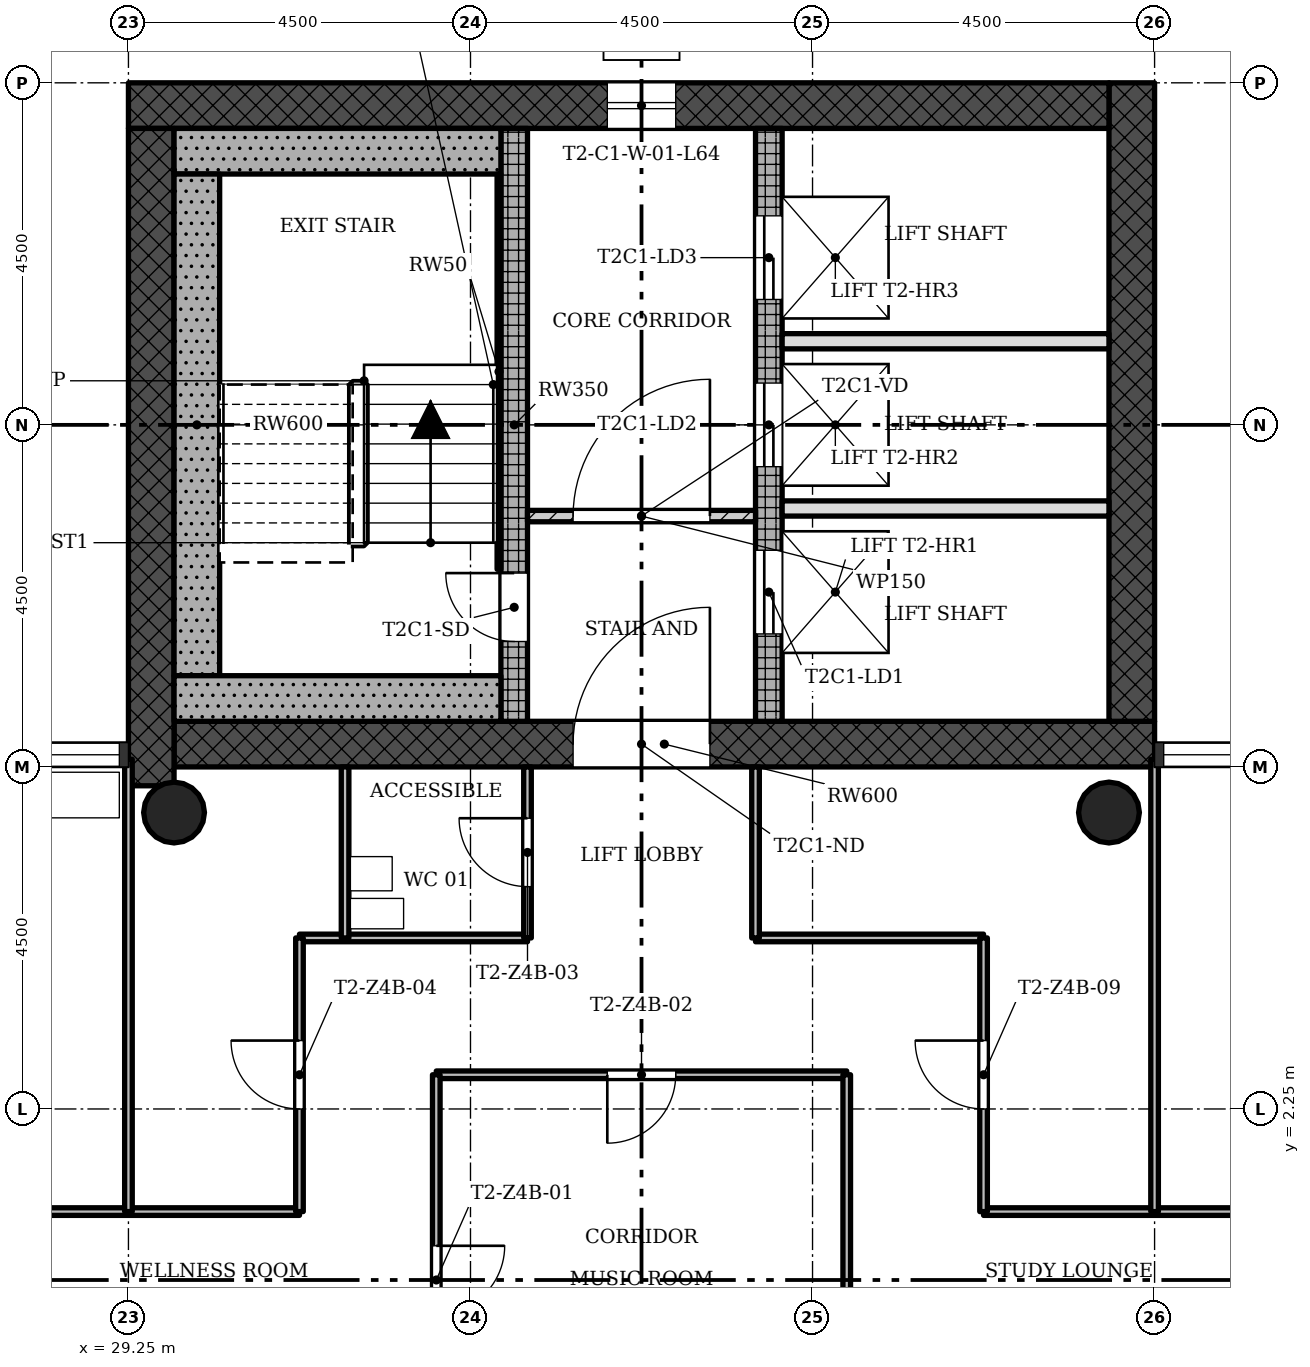
"""IFC4 building model, lengths in metres.
Left out: names, types, materials, properties, quantities, classifications, styles, units other than length and angle.
Written with IfcOpenShell. Run it as: python <this file> out.ifc"""

import sys

from ifc_helpers import new_model, si_unit, direction, frame, frame_2d, origin, origin_2d, place, context, subcontext, project, spatial, rectangle, hollow_circle, extrude, element, fill, save


model = new_model("IFC4")
c1 = context("Model", 3, precision=1e-05, world=origin(), true_north=direction((0.0, 1.0)))
c2 = subcontext(c1, "Body", "Model", "MODEL_VIEW")
j1 = project(units=[si_unit("LENGTHUNIT", "METRE"), si_unit("PLANEANGLEUNIT", "RADIAN")], contexts=[c1])
p1 = place(None, origin())
s1 = spatial("IfcSite", under=j1, at=p1, CompositionType="ELEMENT")
p2 = place(p1, origin())
s2 = spatial("IfcBuilding", under=s1, at=p2, CompositionType="ELEMENT")
p3 = place(p2, frame((0.0, 0.0, 230.0)))
s3 = spatial("IfcBuildingStorey", under=s2, at=p3, CompositionType="ELEMENT", Elevation=230.0)
p4 = place(p3, frame((29.85, 7.05, 0.0), z_axis=(0.0, 0.0, 1.0), x_axis=(1.0, 0.0, 0.0)))
e1 = element("IfcWall", 1, at=p4, inside=s3, PredefinedType="SHEAR", context=c2, shape_type="SweptSolid", body=[
    extrude(rectangle(XDim=12.9, YDim=0.6, at=frame_2d((6.45, 0.0))), origin(), (0.0, 0.0, 1.0), 3.4),
])
p5 = place(p4, frame((5.25, 0.0, 0.0)))
e2 = element("IfcOpeningElement", 2, at=p5, cuts=e1, PredefinedType="OPENING", context=c2, shape_type="SweptSolid", body=[
    extrude(rectangle(XDim=1.8, YDim=2.1, at=frame_2d((0.9, 1.05))), frame((0.0, 0.31, 0.0), z_axis=(0.0, -1.0, 0.0), x_axis=(1.0, 0.0, 0.0)), (0.0, 0.0, 1.0), 0.62),
])
p6 = place(p3, frame((42.45, 7.35, 0.0), z_axis=(0.0, 0.0, 1.0), x_axis=(0.0, 1.0, 0.0)))
e3 = element("IfcWall", 3, at=p6, inside=s3, PredefinedType="SHEAR", context=c2, shape_type="SweptSolid", body=[
    extrude(rectangle(XDim=8.4, YDim=0.6, at=frame_2d((4.2, 0.0))), origin(), (0.0, 0.0, 1.0), 3.4),
])
p7 = place(p3, frame((42.15, 15.45, 0.0), z_axis=(0.0, 0.0, 1.0), x_axis=(-1.0, 0.0, 0.0)))
e4 = element("IfcWall", 4, at=p7, inside=s3, PredefinedType="SHEAR", context=c2, shape_type="SweptSolid", body=[
    extrude(rectangle(XDim=12.9, YDim=0.6, at=frame_2d((6.45, 0.0))), origin(), (0.0, 0.0, 1.0), 3.4),
])
p8 = place(p7, frame((5.7, 0.0, 0.45)))
e5 = element("IfcOpeningElement", 5, at=p8, cuts=e4, PredefinedType="OPENING", context=c2, shape_type="SweptSolid", body=[
    extrude(rectangle(XDim=0.9, YDim=2.4, at=frame_2d((0.45, 1.2))), frame((0.0, 0.31, 0.0), z_axis=(0.0, -1.0, 0.0), x_axis=(1.0, 0.0, 0.0)), (0.0, 0.0, 1.0), 0.62),
])
p9 = place(p3, frame((29.55, 15.15, 0.0), z_axis=(0.0, 0.0, 1.0), x_axis=(0.0, -1.0, 0.0)))
e6 = element("IfcWall", 6, at=p9, inside=s3, PredefinedType="SHEAR", context=c2, shape_type="SweptSolid", body=[
    extrude(rectangle(XDim=8.648, YDim=0.6, at=frame_2d((4.324, 0.0))), origin(), (0.0, 0.0, 1.0), 3.4),
])
p10 = place(p3, frame((34.325, 7.35, 0.0), z_axis=(0.0, 0.0, 1.0), x_axis=(0.0, 1.0, 0.0)))
e7 = element("IfcWall", 7, at=p10, inside=s3, PredefinedType="SHEAR", context=c2, shape_type="SweptSolid", body=[
    extrude(rectangle(XDim=7.8, YDim=0.35, at=frame_2d((3.9, 0.0))), origin(), (0.0, 0.0, 1.0), 3.4),
])
p11 = place(p10, frame((1.05, 0.0, 0.0)))
e8 = element("IfcOpeningElement", 8, at=p11, cuts=e7, PredefinedType="OPENING", context=c2, shape_type="SweptSolid", body=[
    extrude(rectangle(XDim=0.9, YDim=2.1, at=frame_2d((0.45, 1.05))), frame((0.0, 0.185, 0.0), z_axis=(0.0, -1.0, 0.0), x_axis=(1.0, 0.0, 0.0)), (0.0, 0.0, 1.0), 0.37),
])
p12 = place(p3, frame((37.675, 7.35, 0.0), z_axis=(0.0, 0.0, 1.0), x_axis=(0.0, 1.0, 0.0)))
e9 = element("IfcWall", 9, at=p12, inside=s3, PredefinedType="SHEAR", context=c2, shape_type="SweptSolid", body=[
    extrude(rectangle(XDim=7.8, YDim=0.35, at=frame_2d((3.9, 0.0))), origin(), (0.0, 0.0, 1.0), 3.4),
])
p13 = place(p12, frame((1.15, 0.0, 0.0)))
e10 = element("IfcOpeningElement", 10, at=p13, cuts=e9, PredefinedType="OPENING", context=c2, shape_type="SweptSolid", body=[
    extrude(rectangle(XDim=1.1, YDim=2.1, at=frame_2d((0.55, 1.05))), frame((0.0, 0.185, 0.0), z_axis=(0.0, -1.0, 0.0), x_axis=(1.0, 0.0, 0.0)), (0.0, 0.0, 1.0), 0.37),
])
p14 = place(p12, frame((3.35, 0.0, 0.0)))
e11 = element("IfcOpeningElement", 11, at=p14, cuts=e9, PredefinedType="OPENING", context=c2, shape_type="SweptSolid", body=[
    extrude(rectangle(XDim=1.1, YDim=2.1, at=frame_2d((0.55, 1.05))), frame((0.0, 0.185, 0.0), z_axis=(0.0, -1.0, 0.0), x_axis=(1.0, 0.0, 0.0)), (0.0, 0.0, 1.0), 0.37),
])
p15 = place(p12, frame((5.55, 0.0, 0.0)))
e12 = element("IfcOpeningElement", 12, at=p15, cuts=e9, PredefinedType="OPENING", context=c2, shape_type="SweptSolid", body=[
    extrude(rectangle(XDim=1.1, YDim=2.1, at=frame_2d((0.55, 1.05))), frame((0.0, 0.185, 0.0), z_axis=(0.0, -1.0, 0.0), x_axis=(1.0, 0.0, 0.0)), (0.0, 0.0, 1.0), 0.37),
])
for number, where, z_axis, x_axis in (
    (13, (42.15, 6.15, 0.0), (0.0, 0.0, 1.0), (1.0, 0.0, 0.0)),
    (14, (29.85, 6.15, 0.0), (0.0, 0.0, 1.0), (1.0, 0.0, 0.0)),
):
    element("IfcColumn", number, at=place(p3, frame(where, z_axis=z_axis, x_axis=x_axis)), inside=s3, PredefinedType="COLUMN", context=c2, shape_type="SweptSolid", body=[
        extrude(hollow_circle(Radius=0.4, WallThickness=0.028, at=origin_2d()), origin(), (0.0, 0.0, 1.0), 3.4),
    ])
p16 = place(p3, frame((37.5, 10.05, 0.0), z_axis=(0.0, 0.0, 1.0), x_axis=(-1.0, 0.0, 0.0)))
e15 = element("IfcWall", 15, at=p16, inside=s3, PredefinedType="PARTITIONING", context=c2, shape_type="SweptSolid", body=[
    extrude(rectangle(XDim=3.0, YDim=0.15, at=frame_2d((1.5, 0.0))), origin(), (0.0, 0.0, 1.0), 2.98),
])
p17 = place(p16, frame((0.6, 0.0, 0.0)))
e16 = element("IfcOpeningElement", 16, at=p17, cuts=e15, PredefinedType="OPENING", context=c2, shape_type="SweptSolid", body=[
    extrude(rectangle(XDim=1.8, YDim=2.1, at=frame_2d((0.9, 1.05))), frame((0.0, 0.085, 0.0), z_axis=(0.0, -1.0, 0.0), x_axis=(1.0, 0.0, 0.0)), (0.0, 0.0, 1.0), 0.17),
])
for number, where, z_axis, x_axis in (
    (17, (42.15, 10.15, 0.0), (0.0, 0.0, 1.0), (-1.0, 0.0, 0.0)),
    (18, (42.15, 12.35, 0.0), (0.0, 0.0, 1.0), (-1.0, 0.0, 0.0)),
):
    element("IfcWall", number, at=place(p3, frame(where, z_axis=z_axis, x_axis=x_axis)), inside=s3, PredefinedType="SOLIDWALL", context=c2, shape_type="SweptSolid", body=[
        extrude(rectangle(XDim=4.3, YDim=0.2, at=frame_2d((2.15, 0.0))), origin(), (0.0, 0.0, 1.0), 2.98),
    ])
for number, where, z_axis, x_axis in (
    (19, (44.55, 0.9, 0.0), (0.0, 0.0, 1.0), (-1.0, 0.0, 0.0)),
    (20, (31.5, 0.9, 0.0), (0.0, 0.0, 1.0), (-1.0, 0.0, 0.0)),
):
    element("IfcWall", number, at=place(p3, frame(where, z_axis=z_axis, x_axis=x_axis)), inside=s3, PredefinedType="PARTITIONING", context=c2, shape_type="SweptSolid", body=[
        extrude(rectangle(XDim=4.05, YDim=0.1, at=frame_2d((2.025, 0.0))), origin(), (0.0, 0.0, 1.0), 2.98),
    ])
p18 = place(p3, frame((38.7, 2.7, 0.0), z_axis=(0.0, 0.0, 1.0), x_axis=(-1.0, 0.0, 0.0)))
e21 = element("IfcWall", 21, at=p18, inside=s3, PredefinedType="PARTITIONING", context=c2, shape_type="SweptSolid", body=[
    extrude(rectangle(XDim=5.4, YDim=0.1, at=frame_2d((2.7, 0.0))), origin(), (0.0, 0.0, 1.0), 2.98),
])
p19 = place(p18, frame((2.25, 0.0, 0.0)))
e22 = element("IfcOpeningElement", 22, at=p19, cuts=e21, PredefinedType="OPENING", context=c2, shape_type="SweptSolid", body=[
    extrude(rectangle(XDim=0.9, YDim=2.1, at=frame_2d((0.45, 1.05))), frame((0.0, 0.06, 0.0), z_axis=(0.0, -1.0, 0.0), x_axis=(1.0, 0.0, 0.0)), (0.0, 0.0, 1.0), 0.12),
])
for number, where, z_axis, x_axis in (
    (23, (40.5, 4.5, 0.0), (0.0, 0.0, 1.0), (-1.0, 0.0, 0.0)),
    (24, (34.5, 4.5, 0.0), (0.0, 0.0, 1.0), (-1.0, 0.0, 0.0)),
):
    element("IfcWall", number, at=place(p3, frame(where, z_axis=z_axis, x_axis=x_axis)), inside=s3, PredefinedType="PARTITIONING", context=c2, shape_type="SweptSolid", body=[
        extrude(rectangle(XDim=3.0, YDim=0.1, at=frame_2d((1.5, 0.0))), origin(), (0.0, 0.0, 1.0), 2.98),
    ])
p20 = place(p3, frame((42.75, 0.9, 0.0), z_axis=(0.0, 0.0, 1.0), x_axis=(0.0, 1.0, 0.0)))
e25 = element("IfcWall", 25, at=p20, inside=s3, PredefinedType="PARTITIONING", context=c2, shape_type="SweptSolid", body=[
    extrude(rectangle(XDim=5.95, YDim=0.1, at=frame_2d((2.975, 0.0))), origin(), (0.0, 0.0, 1.0), 2.98),
])
p21 = place(p3, frame((40.5, 0.9, 0.0), z_axis=(0.0, 0.0, 1.0), x_axis=(0.0, 1.0, 0.0)))
e26 = element("IfcWall", 26, at=p21, inside=s3, PredefinedType="PARTITIONING", context=c2, shape_type="SweptSolid", body=[
    extrude(rectangle(XDim=3.6, YDim=0.1, at=frame_2d((1.8, 0.0))), origin(), (0.0, 0.0, 1.0), 2.98),
])
p22 = place(p21, frame((1.35, 0.0, 0.0)))
e27 = element("IfcOpeningElement", 27, at=p22, cuts=e26, PredefinedType="OPENING", context=c2, shape_type="SweptSolid", body=[
    extrude(rectangle(XDim=0.9, YDim=2.1, at=frame_2d((0.45, 1.05))), frame((0.0, 0.06, 0.0), z_axis=(0.0, -1.0, 0.0), x_axis=(1.0, 0.0, 0.0)), (0.0, 0.0, 1.0), 0.12),
])
p23 = place(p3, frame((38.7, -2.7, 0.0), z_axis=(0.0, 0.0, 1.0), x_axis=(0.0, 1.0, 0.0)))
e28 = element("IfcWall", 28, at=p23, inside=s3, PredefinedType="PARTITIONING", context=c2, shape_type="SweptSolid", body=[
    extrude(rectangle(XDim=5.4, YDim=0.1, at=frame_2d((2.7, 0.0))), origin(), (0.0, 0.0, 1.0), 2.98),
])
p24 = place(p3, frame((37.5, 4.5, 0.0), z_axis=(0.0, 0.0, 1.0), x_axis=(0.0, 1.0, 0.0)))
e29 = element("IfcWall", 29, at=p24, inside=s3, PredefinedType="PARTITIONING", context=c2, shape_type="SweptSolid", body=[
    extrude(rectangle(XDim=2.25, YDim=0.1, at=frame_2d((1.125, 0.0))), origin(), (0.0, 0.0, 1.0), 2.98),
])
p25 = place(p3, frame((34.5, 4.5, 0.0), z_axis=(0.0, 0.0, 1.0), x_axis=(0.0, 1.0, 0.0)))
e30 = element("IfcWall", 30, at=p25, inside=s3, PredefinedType="PARTITIONING", context=c2, shape_type="SweptSolid", body=[
    extrude(rectangle(XDim=2.25, YDim=0.1, at=frame_2d((1.125, 0.0))), origin(), (0.0, 0.0, 1.0), 2.98),
])
p26 = place(p25, frame((0.675, 0.0, 0.0)))
e31 = element("IfcOpeningElement", 31, at=p26, cuts=e30, PredefinedType="OPENING", context=c2, shape_type="SweptSolid", body=[
    extrude(rectangle(XDim=0.9, YDim=2.1, at=frame_2d((0.45, 1.05))), frame((0.0, 0.06, 0.0), z_axis=(0.0, -1.0, 0.0), x_axis=(1.0, 0.0, 0.0)), (0.0, 0.0, 1.0), 0.12),
])
p27 = place(p3, frame((33.3, -2.7, 0.0), z_axis=(0.0, 0.0, 1.0), x_axis=(0.0, 1.0, 0.0)))
e32 = element("IfcWall", 32, at=p27, inside=s3, PredefinedType="PARTITIONING", context=c2, shape_type="SweptSolid", body=[
    extrude(rectangle(XDim=5.4, YDim=0.1, at=frame_2d((2.7, 0.0))), origin(), (0.0, 0.0, 1.0), 2.98),
])
p28 = place(p27, frame((2.25, 0.0, 0.0)))
e33 = element("IfcOpeningElement", 33, at=p28, cuts=e32, PredefinedType="OPENING", context=c2, shape_type="SweptSolid", body=[
    extrude(rectangle(XDim=0.9, YDim=2.1, at=frame_2d((0.45, 1.05))), frame((0.0, 0.06, 0.0), z_axis=(0.0, -1.0, 0.0), x_axis=(1.0, 0.0, 0.0)), (0.0, 0.0, 1.0), 0.12),
])
p29 = place(p3, frame((32.1, 4.5, 0.0), z_axis=(0.0, 0.0, 1.0), x_axis=(0.0, 1.0, 0.0)))
e34 = element("IfcWall", 34, at=p29, inside=s3, PredefinedType="PARTITIONING", context=c2, shape_type="SweptSolid", body=[
    extrude(rectangle(XDim=2.25, YDim=0.1, at=frame_2d((1.125, 0.0))), origin(), (0.0, 0.0, 1.0), 2.98),
])
p30 = place(p3, frame((31.5, 0.9, 0.0), z_axis=(0.0, 0.0, 1.0), x_axis=(0.0, 1.0, 0.0)))
e35 = element("IfcWall", 35, at=p30, inside=s3, PredefinedType="PARTITIONING", context=c2, shape_type="SweptSolid", body=[
    extrude(rectangle(XDim=3.6, YDim=0.1, at=frame_2d((1.8, 0.0))), origin(), (0.0, 0.0, 1.0), 2.98),
])
p31 = place(p30, frame((1.35, 0.0, 0.0)))
e36 = element("IfcOpeningElement", 36, at=p31, cuts=e35, PredefinedType="OPENING", context=c2, shape_type="SweptSolid", body=[
    extrude(rectangle(XDim=0.9, YDim=2.1, at=frame_2d((0.45, 1.05))), frame((0.0, 0.06, 0.0), z_axis=(0.0, -1.0, 0.0), x_axis=(1.0, 0.0, 0.0)), (0.0, 0.0, 1.0), 0.12),
])
p32 = place(p3, frame((29.25, 0.9, 0.0), z_axis=(0.0, 0.0, 1.0), x_axis=(0.0, 1.0, 0.0)))
e37 = element("IfcWall", 37, at=p32, inside=s3, PredefinedType="PARTITIONING", context=c2, shape_type="SweptSolid", body=[
    extrude(rectangle(XDim=5.95, YDim=0.1, at=frame_2d((2.975, 0.0))), origin(), (0.0, 0.0, 1.0), 2.98),
])
p33 = place(p3, frame((34.15, 14.85, 0.0), z_axis=(0.0, 0.0, 1.0), x_axis=(-1.0, 0.0, 0.0)))
e38 = element("IfcWall", 38, at=p33, inside=s3, PredefinedType="SHEAR", context=c2, shape_type="SweptSolid", body=[
    extrude(rectangle(XDim=4.3, YDim=0.6, at=frame_2d((2.15, 0.0))), origin(), (0.0, 0.0, 1.0), 3.4),
])
p34 = place(p3, frame((30.15, 7.95, 0.0), z_axis=(0.0, 0.0, 1.0), x_axis=(0.0, 1.0, 0.0)))
e39 = element("IfcWall", 39, at=p34, inside=s3, PredefinedType="SHEAR", context=c2, shape_type="SweptSolid", body=[
    extrude(rectangle(XDim=6.6, YDim=0.6, at=frame_2d((3.3, 0.0))), origin(), (0.0, 0.0, 1.0), 3.4),
])
p35 = place(p3, frame((34.15, 7.65, 0.0), z_axis=(0.0, 0.0, 1.0), x_axis=(-1.0, 0.0, 0.0)))
e40 = element("IfcWall", 40, at=p35, inside=s3, PredefinedType="SHEAR", context=c2, shape_type="SweptSolid", body=[
    extrude(rectangle(XDim=4.3, YDim=0.6, at=frame_2d((2.15, 0.0))), origin(), (0.0, 0.0, 1.0), 3.4),
])
p36 = place(p3, frame((34.125, 9.35, 0.0), z_axis=(0.0, 0.0, 1.0), x_axis=(0.0, 1.0, 0.0)))
e41 = element("IfcWall", 41, at=p36, inside=s3, PredefinedType="SHEAR", context=c2, shape_type="SweptSolid", body=[
    extrude(rectangle(XDim=5.2, YDim=0.05, at=frame_2d((2.6, 0.0))), origin(), (0.0, 0.0, 1.0), 3.4),
])
p37 = place(p8, origin())
e42 = element("IfcWindow", 42, at=p37, inside=s3, PartitioningType="SINGLE_PANEL", PredefinedType="WINDOW", context=c2, shape_type="SweptSolid", body=[
    extrude(rectangle(XDim=0.9, YDim=2.4, at=frame_2d((0.45, 1.2))), frame((0.0, 0.03, 0.0), z_axis=(0.0, -1.0, 0.0), x_axis=(1.0, 0.0, 0.0)), (0.0, 0.0, 1.0), 0.06),
])
fill(e5, e42)
p38 = place(p17, origin())
e43 = element("IfcDoor", 43, at=p38, inside=s3, OperationType="SINGLE_SWING_LEFT", PredefinedType="DOOR", context=c2, shape_type="SweptSolid", body=[
    extrude(rectangle(XDim=1.8, YDim=2.1, at=frame_2d((0.9, 1.05))), frame((0.0, 0.025, 0.0), z_axis=(0.0, -1.0, 0.0), x_axis=(1.0, 0.0, 0.0)), (0.0, 0.0, 1.0), 0.05),
])
fill(e16, e43)
p39 = place(p28, origin())
e44 = element("IfcDoor", 44, at=p39, inside=s3, OperationType="SINGLE_SWING_RIGHT", PredefinedType="DOOR", context=c2, shape_type="SweptSolid", body=[
    extrude(rectangle(XDim=0.9, YDim=2.1, at=frame_2d((0.45, 1.05))), frame((0.0, 0.025, 0.0), z_axis=(0.0, -1.0, 0.0), x_axis=(1.0, 0.0, 0.0)), (0.0, 0.0, 1.0), 0.05),
])
fill(e33, e44)
p40 = place(p19, origin())
e45 = element("IfcDoor", 45, at=p40, inside=s3, OperationType="SINGLE_SWING_LEFT", PredefinedType="DOOR", context=c2, shape_type="SweptSolid", body=[
    extrude(rectangle(XDim=0.9, YDim=2.1, at=frame_2d((0.45, 1.05))), frame((0.0, 0.025, 0.0), z_axis=(0.0, -1.0, 0.0), x_axis=(1.0, 0.0, 0.0)), (0.0, 0.0, 1.0), 0.05),
])
fill(e22, e45)
p41 = place(p26, origin())
e46 = element("IfcDoor", 46, at=p41, inside=s3, OperationType="SINGLE_SWING_LEFT", PredefinedType="DOOR", context=c2, shape_type="SweptSolid", body=[
    extrude(rectangle(XDim=0.9, YDim=2.1, at=frame_2d((0.45, 1.05))), frame((0.0, 0.025, 0.0), z_axis=(0.0, -1.0, 0.0), x_axis=(1.0, 0.0, 0.0)), (0.0, 0.0, 1.0), 0.05),
])
fill(e31, e46)
p42 = place(p31, origin())
e47 = element("IfcDoor", 47, at=p42, inside=s3, OperationType="SINGLE_SWING_LEFT", PredefinedType="DOOR", context=c2, shape_type="SweptSolid", body=[
    extrude(rectangle(XDim=0.9, YDim=2.1, at=frame_2d((0.45, 1.05))), frame((0.0, 0.025, 0.0), z_axis=(0.0, -1.0, 0.0), x_axis=(1.0, 0.0, 0.0)), (0.0, 0.0, 1.0), 0.05),
])
fill(e36, e47)
p43 = place(p22, origin())
e48 = element("IfcDoor", 48, at=p43, inside=s3, OperationType="SINGLE_SWING_LEFT", PredefinedType="DOOR", context=c2, shape_type="SweptSolid", body=[
    extrude(rectangle(XDim=0.9, YDim=2.1, at=frame_2d((0.45, 1.05))), frame((0.0, 0.025, 0.0), z_axis=(0.0, -1.0, 0.0), x_axis=(1.0, 0.0, 0.0)), (0.0, 0.0, 1.0), 0.05),
])
fill(e27, e48)
p44 = place(p11, origin())
e49 = element("IfcDoor", 49, at=p44, inside=s3, OperationType="SINGLE_SWING_LEFT", PredefinedType="DOOR", context=c2, shape_type="SweptSolid", body=[
    extrude(rectangle(XDim=0.9, YDim=2.1, at=frame_2d((0.45, 1.05))), frame((0.0, 0.025, 0.0), z_axis=(0.0, -1.0, 0.0), x_axis=(1.0, 0.0, 0.0)), (0.0, 0.0, 1.0), 0.05),
])
fill(e8, e49)
p45 = place(p13, origin())
e50 = element("IfcDoor", 50, at=p45, inside=s3, OperationType="SLIDING_TO_LEFT", PredefinedType="DOOR", context=c2, shape_type="SweptSolid", body=[
    extrude(rectangle(XDim=1.1, YDim=2.1, at=frame_2d((0.55, 1.05))), frame((0.0, 0.025, 0.0), z_axis=(0.0, -1.0, 0.0), x_axis=(1.0, 0.0, 0.0)), (0.0, 0.0, 1.0), 0.05),
])
fill(e10, e50)
p46 = place(p14, origin())
e51 = element("IfcDoor", 51, at=p46, inside=s3, OperationType="SLIDING_TO_LEFT", PredefinedType="DOOR", context=c2, shape_type="SweptSolid", body=[
    extrude(rectangle(XDim=1.1, YDim=2.1, at=frame_2d((0.55, 1.05))), frame((0.0, 0.025, 0.0), z_axis=(0.0, -1.0, 0.0), x_axis=(1.0, 0.0, 0.0)), (0.0, 0.0, 1.0), 0.05),
])
fill(e11, e51)
p47 = place(p15, origin())
e52 = element("IfcDoor", 52, at=p47, inside=s3, OperationType="SLIDING_TO_LEFT", PredefinedType="DOOR", context=c2, shape_type="SweptSolid", body=[
    extrude(rectangle(XDim=1.1, YDim=2.1, at=frame_2d((0.55, 1.05))), frame((0.0, 0.025, 0.0), z_axis=(0.0, -1.0, 0.0), x_axis=(1.0, 0.0, 0.0)), (0.0, 0.0, 1.0), 0.05),
])
fill(e12, e52)
p48 = place(p5, origin())
e53 = element("IfcDoor", 53, at=p48, inside=s3, OperationType="SINGLE_SWING_LEFT", PredefinedType="DOOR", context=c2, shape_type="SweptSolid", body=[
    extrude(rectangle(XDim=1.8, YDim=2.1, at=frame_2d((0.9, 1.05))), frame((0.0, 0.025, 0.0), z_axis=(0.0, -1.0, 0.0), x_axis=(1.0, 0.0, 0.0)), (0.0, 0.0, 1.0), 0.05),
])
fill(e2, e53)
save(model, sys.argv[1])
